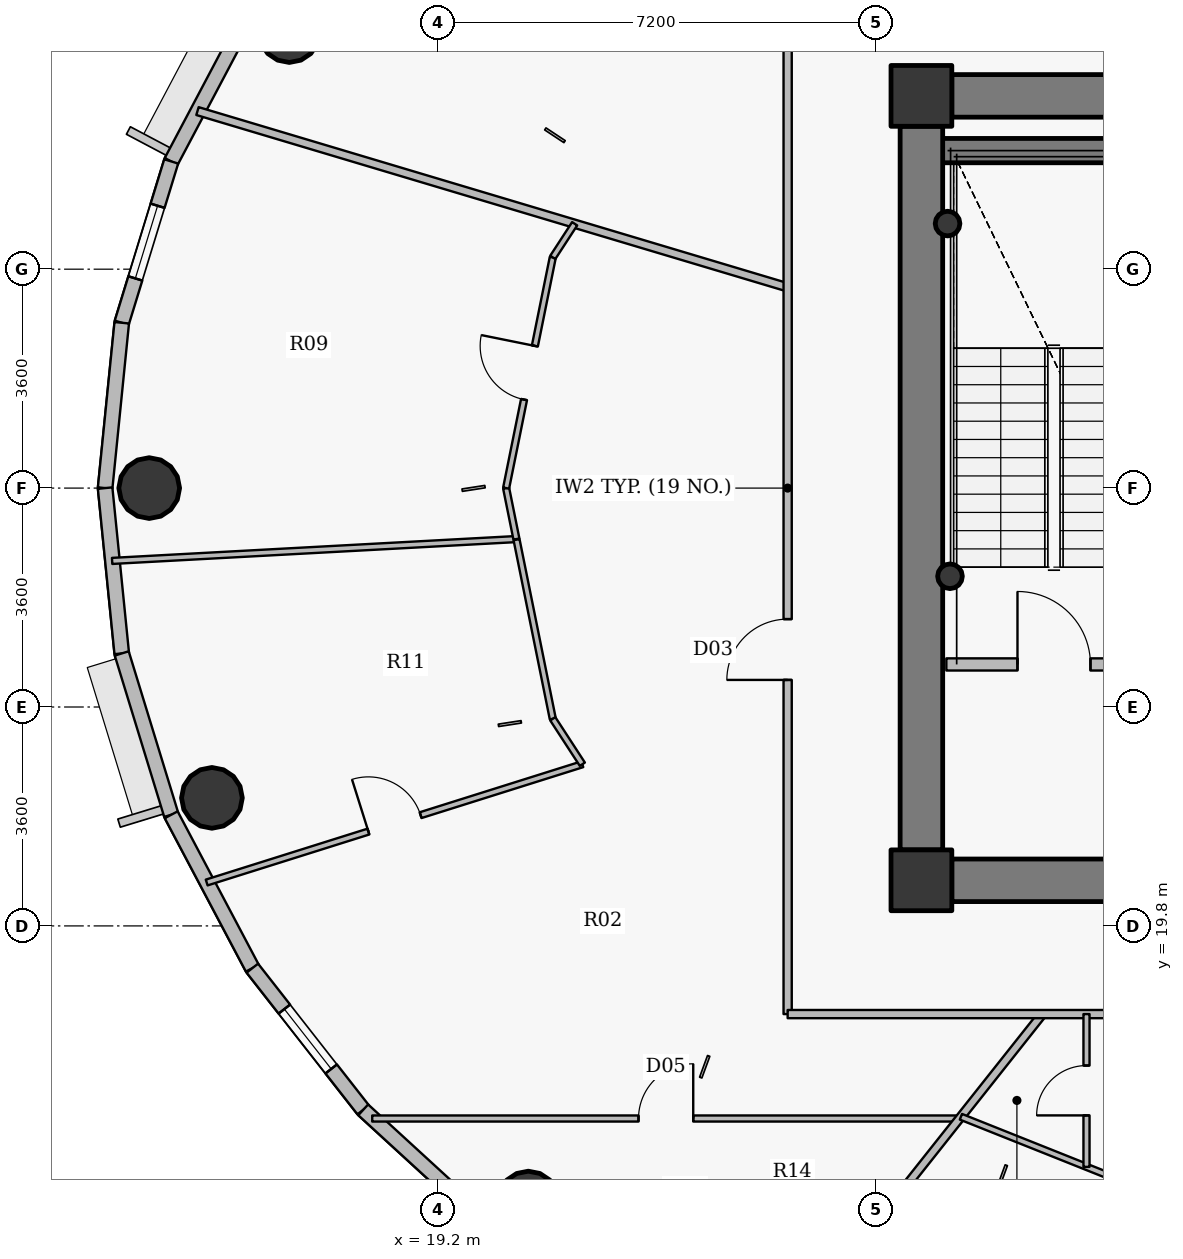
"""IFC4 building model, lengths in metres.
Left out: names, types, materials, properties, quantities, classifications, styles, units other than length and angle.
Written with IfcOpenShell. Run it as: python <this file> out.ifc"""

import sys

from ifc_helpers import new_model, si_unit, direction, frame, frame_2d, origin, origin_2d, place, context, subcontext, project, spatial, rectangle, hollow_circle, extrude, source, transform, mapped, element, fill, save


model = new_model("IFC4")
c1 = context("Model", 3, precision=1e-05, world=origin(), true_north=direction((0.0, 1.0)))
c2 = subcontext(c1, "Body", "Model", "MODEL_VIEW")
j1 = project(units=[si_unit("LENGTHUNIT", "METRE"), si_unit("PLANEANGLEUNIT", "RADIAN")], contexts=[c1])
p1 = place(None, origin())
s1 = spatial("IfcSite", under=j1, at=p1, CompositionType="ELEMENT")
p2 = place(p1, origin())
s2 = spatial("IfcBuilding", under=s1, at=p2, CompositionType="ELEMENT")
p3 = place(p2, frame((0.0, 0.0, 273.0)))
s3 = spatial("IfcBuildingStorey", under=s2, at=p3, CompositionType="ELEMENT", Elevation=273.0)
for number, where, z_axis, x_axis in (
    (1, (27.15, 20.55, 0.0), (0.0, 0.0, 1.0), (1.0, 0.0, 0.0)),
    (2, (27.15, 33.45, 0.0), (0.0, 0.0, 1.0), (1.0, 0.0, 0.0)),
):
    element("IfcColumn", number, at=place(p3, frame(where, z_axis=z_axis, x_axis=x_axis)), inside=s3, PredefinedType="COLUMN", context=c2, shape_type="SweptSolid", body=[
        extrude(rectangle(XDim=1.0, YDim=1.0, at=origin_2d()), origin(), (0.0, 0.0, 1.0), 3.75),
    ])
p4 = place(p3, frame((27.25, 32.55, 0.0), z_axis=(0.0, 0.0, 1.0), x_axis=(1.0, 0.0, 0.0)))
e3 = element("IfcWall", 3, at=p4, inside=s3, PredefinedType="SHEAR", context=c2, shape_type="SweptSolid", body=[
    extrude(rectangle(XDim=4.13, YDim=0.4, at=frame_2d((2.065, 0.0))), origin(), (0.0, 0.0, 1.0), 3.75),
])
for number, where, z_axis, x_axis in (
    (4, (27.58, 31.35, 0.0), (0.0, 0.0, 1.0), (1.0, 0.0, 0.0)),
    (5, (27.62, 25.55, 0.0), (0.0, 0.0, 1.0), (1.0, 0.0, 0.0)),
):
    element("IfcColumn", number, at=place(p3, frame(where, z_axis=z_axis, x_axis=x_axis)), inside=s3, PredefinedType="COLUMN", context=c2, shape_type="SweptSolid", body=[
        extrude(hollow_circle(Radius=0.203, WallThickness=0.016, at=origin_2d()), origin(), (0.0, 0.0, 1.0), 3.75),
    ])
p5 = place(p3, frame((27.65, 33.45, 0.0), z_axis=(0.0, 0.0, 1.0), x_axis=(1.0, 0.0, 0.0)))
e6 = element("IfcWall", 6, at=p5, inside=s3, PredefinedType="SHEAR", context=c2, shape_type="SweptSolid", body=[
    extrude(rectangle(XDim=16.7, YDim=0.7, at=frame_2d((8.35, 0.0))), origin(), (0.0, 0.0, 1.0), 3.05),
])
p6 = place(p5, frame((12.775, 0.0, 0.0)))
e7 = element("IfcOpeningElement", 7, at=p6, cuts=e6, PredefinedType="OPENING", context=c2, shape_type="SweptSolid", body=[
    extrude(rectangle(XDim=1.15, YDim=2.15, at=origin_2d()), frame((0.575, 0.36, 1.075), z_axis=(0.0, -1.0, 0.0), x_axis=(1.0, 0.0, 0.0)), (0.0, 0.0, 1.0), 0.72),
])
p7 = place(p3, frame((44.35, 20.55, 0.0), z_axis=(0.0, 0.0, 1.0), x_axis=(-1.0, 0.0, 0.0)))
e8 = element("IfcWall", 8, at=p7, inside=s3, PredefinedType="SHEAR", context=c2, shape_type="SweptSolid", body=[
    extrude(rectangle(XDim=16.7, YDim=0.7, at=frame_2d((8.35, 0.0))), origin(), (0.0, 0.0, 1.0), 3.05),
])
p8 = place(p7, frame((12.925, 0.0, 0.0)))
e9 = element("IfcOpeningElement", 9, at=p8, cuts=e8, PredefinedType="OPENING", context=c2, shape_type="SweptSolid", body=[
    extrude(rectangle(XDim=1.15, YDim=2.15, at=origin_2d()), frame((0.575, 0.36, 1.075), z_axis=(0.0, -1.0, 0.0), x_axis=(1.0, 0.0, 0.0)), (0.0, 0.0, 1.0), 0.72),
])
p9 = place(p7, frame((9.1, 0.0, 0.0)))
e10 = element("IfcOpeningElement", 10, at=p9, cuts=e8, PredefinedType="OPENING", context=c2, shape_type="SweptSolid", body=[
    extrude(rectangle(XDim=1.15, YDim=2.15, at=origin_2d()), frame((0.575, 0.36, 1.075), z_axis=(0.0, -1.0, 0.0), x_axis=(1.0, 0.0, 0.0)), (0.0, 0.0, 1.0), 0.72),
])
p10 = place(p3, frame((27.15, 21.05, 0.0), z_axis=(0.0, 0.0, 1.0), x_axis=(0.0, 1.0, 0.0)))
e11 = element("IfcWall", 11, at=p10, inside=s3, PredefinedType="SHEAR", context=c2, shape_type="SweptSolid", body=[
    extrude(rectangle(XDim=11.9, YDim=0.7, at=frame_2d((5.95, 0.0))), origin(), (0.0, 0.0, 1.0), 3.05),
])
for number, where, z_axis, x_axis in (
    (12, (16.754, 34.5, 0.0), (0.0, 0.0, 1.0), (1.0, 0.0, 0.0)),
    (13, (14.45, 27.0, 0.0), (0.0, 0.0, 1.0), (1.0, 0.0, 0.0)),
    (14, (15.481, 21.906, 0.0), (0.0, 0.0, 1.0), (1.0, 0.0, 0.0)),
    (15, (20.685, 15.267, 0.0), (0.0, 0.0, 1.0), (1.0, 0.0, 0.0)),
):
    element("IfcColumn", number, at=place(p3, frame(where, z_axis=z_axis, x_axis=x_axis)), inside=s3, PredefinedType="COLUMN", context=c2, shape_type="SweptSolid", body=[
        extrude(hollow_circle(Radius=0.5, WallThickness=0.032, at=origin_2d()), origin(), (0.0, 0.0, 1.0), 3.75),
    ])
p11 = place(p3, frame((14.812, 32.372, 0.0), z_axis=(0.0, 0.0, 1.0), x_axis=(0.467628269026, 0.883925224218, 0.0)))
e16 = element("IfcWall", 16, at=p11, inside=s3, PredefinedType="SOLIDWALL", context=c2, shape_type="SweptSolid", body=[
    extrude(rectangle(XDim=2.854, YDim=0.24, at=frame_2d((1.427, 0.0))), origin(), (0.0, 0.0, 1.0), 3.5),
])
p12 = place(p3, frame((13.998, 29.719, 0.0), z_axis=(0.0, 0.0, 1.0), x_axis=(0.2931213403, 0.956075248012, 0.0)))
e17 = element("IfcWall", 17, at=p12, inside=s3, PredefinedType="SOLIDWALL", context=c2, shape_type="SweptSolid", body=[
    extrude(rectangle(XDim=2.775, YDim=0.24, at=frame_2d((1.388, 0.0))), origin(), (0.0, 0.0, 1.0), 3.5),
])
p13 = place(p12, frame((0.763, 0.0, 0.9)))
e18 = element("IfcOpeningElement", 18, at=p13, cuts=e17, PredefinedType="OPENING", context=c2, shape_type="SweptSolid", body=[
    extrude(rectangle(XDim=1.25, YDim=1.65, at=origin_2d()), frame((0.625, 0.13, 0.825), z_axis=(0.0, -1.0, 0.0), x_axis=(1.0, 0.0, 0.0)), (0.0, 0.0, 1.0), 0.26),
])
for number, where, z_axis, x_axis in (
    (19, (13.725, 27.0, 0.0), (0.0, 0.0, 1.0), (0.1, 0.995, 0.0)),
    (20, (13.998, 24.281, 0.0), (0.0, 0.0, 1.0), (-0.1, 0.995, 0.0)),
):
    element("IfcWall", number, at=place(p3, frame(where, z_axis=z_axis, x_axis=x_axis)), inside=s3, PredefinedType="SOLIDWALL", context=c2, shape_type="SweptSolid", body=[
        extrude(rectangle(XDim=2.733, YDim=0.24, at=frame_2d((1.366, 0.0))), origin(), (0.0, 0.0, 1.0), 3.5),
    ])
p14 = place(p3, frame((14.812, 21.628, 0.0), z_axis=(0.0, 0.0, 1.0), x_axis=(-0.2931213403, 0.956075248012, 0.0)))
e21 = element("IfcWall", 21, at=p14, inside=s3, PredefinedType="SOLIDWALL", context=c2, shape_type="SweptSolid", body=[
    extrude(rectangle(XDim=2.775, YDim=0.24, at=frame_2d((1.388, 0.0))), origin(), (0.0, 0.0, 1.0), 3.5),
])
p15 = place(p3, frame((16.146, 19.105, 0.0), z_axis=(0.0, 0.0, 1.0), x_axis=(-0.467628269026, 0.883925224218, 0.0)))
e22 = element("IfcWall", 22, at=p15, inside=s3, PredefinedType="SOLIDWALL", context=c2, shape_type="SweptSolid", body=[
    extrude(rectangle(XDim=2.854, YDim=0.24, at=frame_2d((1.427, 0.0))), origin(), (0.0, 0.0, 1.0), 3.5),
])
p16 = place(p3, frame((17.97, 16.775, 0.0), z_axis=(0.0, 0.0, 1.0), x_axis=(-0.616337186556, 0.787482363275, 0.0)))
e23 = element("IfcWall", 23, at=p16, inside=s3, PredefinedType="SOLIDWALL", context=c2, shape_type="SweptSolid", body=[
    extrude(rectangle(XDim=2.958, YDim=0.24, at=frame_2d((1.479, 0.0))), origin(), (0.0, 0.0, 1.0), 3.5),
])
p17 = place(p16, frame((0.854, 0.0, 0.9)))
e24 = element("IfcOpeningElement", 24, at=p17, cuts=e23, PredefinedType="OPENING", context=c2, shape_type="SweptSolid", body=[
    extrude(rectangle(XDim=1.25, YDim=1.65, at=origin_2d()), frame((0.625, 0.13, 0.825), z_axis=(0.0, -1.0, 0.0), x_axis=(1.0, 0.0, 0.0)), (0.0, 0.0, 1.0), 0.26),
])
p18 = place(p3, frame((20.238, 14.696, 0.0), z_axis=(0.0, 0.0, 1.0), x_axis=(-0.737068506972, 0.675818034703, 0.0)))
e25 = element("IfcWall", 25, at=p18, inside=s3, PredefinedType="SOLIDWALL", context=c2, shape_type="SweptSolid", body=[
    extrude(rectangle(XDim=3.077, YDim=0.24, at=frame_2d((1.539, 0.0))), origin(), (0.0, 0.0, 1.0), 3.5),
])
p19 = place(p3, frame((13.84, 25.802, 0.0), z_axis=(0.0, 0.0, 1.0), x_axis=(0.998542593702, 0.05396932983, 0.0)))
e26 = element("IfcWall", 26, at=p19, inside=s3, PredefinedType="PARTITIONING", context=c2, shape_type="SweptSolid", body=[
    extrude(rectangle(XDim=6.659, YDim=0.1, at=frame_2d((3.33, 0.0))), origin(), (0.0, 0.0, 1.0), 2.985),
])
p20 = place(p3, frame((15.244, 33.2, 0.0), z_axis=(0.0, 0.0, 1.0), x_axis=(0.958167234785, -0.286208927508, 0.0)))
e27 = element("IfcWall", 27, at=p20, inside=s3, PredefinedType="PARTITIONING", context=c2, shape_type="SweptSolid", body=[
    extrude(rectangle(XDim=10.13, YDim=0.135, at=frame_2d((5.065, 0.0))), origin(), (0.0, 0.0, 1.0), 2.985),
])
p21 = place(p3, frame((15.396, 20.514, 0.0), z_axis=(0.0, 0.0, 1.0), x_axis=(0.95385684782, 0.300261742264, 0.0)))
e28 = element("IfcWall", 28, at=p21, inside=s3, PredefinedType="PARTITIONING", context=c2, shape_type="SweptSolid", body=[
    extrude(rectangle(XDim=6.477, YDim=0.1, at=frame_2d((3.239, 0.0))), origin(), (0.0, 0.0, 1.0), 2.985),
])
p22 = place(p21, frame((2.789, 0.0, 0.0)))
e29 = element("IfcOpeningElement", 29, at=p22, cuts=e28, PredefinedType="OPENING", context=c2, shape_type="SweptSolid", body=[
    extrude(rectangle(XDim=0.9, YDim=2.1, at=origin_2d()), frame((0.45, 0.06, 1.05), z_axis=(0.0, -1.0, 0.0), x_axis=(1.0, 0.0, 0.0)), (0.0, 0.0, 1.0), 0.12),
])
p23 = place(p3, frame((18.118, 16.633, 0.0), z_axis=(0.0, 0.0, 1.0), x_axis=(1.0, 0.0, 0.0)))
e30 = element("IfcWall", 30, at=p23, inside=s3, PredefinedType="PARTITIONING", context=c2, shape_type="SweptSolid", body=[
    extrude(rectangle(XDim=9.659, YDim=0.1, at=frame_2d((4.83, 0.0))), origin(), (0.0, 0.0, 1.0), 2.985),
])
p24 = place(p23, frame((4.379, 0.0, 0.0)))
e31 = element("IfcOpeningElement", 31, at=p24, cuts=e30, PredefinedType="OPENING", context=c2, shape_type="SweptSolid", body=[
    extrude(rectangle(XDim=0.9, YDim=2.1, at=origin_2d()), frame((0.45, 0.06, 1.05), z_axis=(0.0, -1.0, 0.0), x_axis=(1.0, 0.0, 0.0)), (0.0, 0.0, 1.0), 0.12),
])
p25 = place(p3, frame((20.32, 27.0, 0.0), z_axis=(0.0, 0.0, 1.0), x_axis=(0.198147261764, -0.980172261725, 0.0)))
e32 = element("IfcWall", 32, at=p25, inside=s3, PredefinedType="PARTITIONING", context=c2, shape_type="SweptSolid", body=[
    extrude(rectangle(XDim=0.855, YDim=0.1, at=frame_2d((0.427, 0.0))), origin(), (0.0, 0.0, 1.0), 3.035),
])
p26 = place(p3, frame((20.32, 27.0, 0.0), z_axis=(0.0, 0.0, 1.0), x_axis=(0.198226068862, 0.980156327135, 0.0)))
e33 = element("IfcWall", 33, at=p26, inside=s3, PredefinedType="PARTITIONING", context=c2, shape_type="SweptSolid", body=[
    extrude(rectangle(XDim=3.871, YDim=0.1, at=frame_2d((1.936, 0.0))), origin(), (0.0, 0.0, 1.0), 3.035),
])
p27 = place(p26, frame((1.486, 0.0, 0.0)))
e34 = element("IfcOpeningElement", 34, at=p27, cuts=e33, PredefinedType="OPENING", context=c2, shape_type="SweptSolid", body=[
    extrude(rectangle(XDim=0.9, YDim=2.1, at=origin_2d()), frame((0.45, 0.06, 1.05), z_axis=(0.0, -1.0, 0.0), x_axis=(1.0, 0.0, 0.0)), (0.0, 0.0, 1.0), 0.12),
])
p28 = place(p3, frame((20.491, 26.152, 0.0), z_axis=(0.0, 0.0, 1.0), x_axis=(0.198255475343, -0.980150379532, 0.0)))
e35 = element("IfcWall", 35, at=p28, inside=s3, PredefinedType="PARTITIONING", context=c2, shape_type="SweptSolid", body=[
    extrude(rectangle(XDim=3.006, YDim=0.1, at=frame_2d((1.503, 0.0))), origin(), (0.0, 0.0, 1.0), 3.035),
])
p29 = place(p3, frame((21.087, 23.206, 0.0), z_axis=(0.0, 0.0, 1.0), x_axis=(0.545565820765, -0.838067977681, 0.0)))
e36 = element("IfcWall", 36, at=p29, inside=s3, PredefinedType="PARTITIONING", context=c2, shape_type="SweptSolid", body=[
    extrude(rectangle(XDim=0.891, YDim=0.1, at=frame_2d((0.446, 0.0))), origin(), (0.0, 0.0, 1.0), 3.035),
])
p30 = place(p3, frame((21.087, 30.794, 0.0), z_axis=(0.0, 0.0, 1.0), x_axis=(0.545443507803, 0.838147588313, 0.0)))
e37 = element("IfcWall", 37, at=p30, inside=s3, PredefinedType="PARTITIONING", context=c2, shape_type="SweptSolid", body=[
    extrude(rectangle(XDim=0.66, YDim=0.1, at=frame_2d((0.33, 0.0))), origin(), (0.0, 0.0, 1.0), 3.5),
])
p31 = place(p3, frame((24.294, 12.242, 0.0), z_axis=(0.0, 0.0, 1.0), x_axis=(0.621439784824, 0.783461928774, 0.0)))
e38 = element("IfcWall", 38, at=p31, inside=s3, PredefinedType="PARTITIONING", context=c2, shape_type="SweptSolid", body=[
    extrude(rectangle(XDim=7.796, YDim=0.135, at=frame_2d((3.898, 0.0))), origin(), (0.0, 0.0, 1.0), 2.985),
])
p32 = place(p3, frame((24.95, 18.35, 0.0), z_axis=(0.0, 0.0, 1.0), x_axis=(0.0, 1.0, 0.0)))
e39 = element("IfcWall", 39, at=p32, inside=s3, PredefinedType="PARTITIONING", context=c2, shape_type="SweptSolid", body=[
    extrude(rectangle(XDim=17.3, YDim=0.135, at=frame_2d((8.65, 0.0))), origin(), (0.0, 0.0, 1.0), 3.035),
])
p33 = place(p32, frame((5.495, 0.0, 0.0)))
e40 = element("IfcOpeningElement", 40, at=p33, cuts=e39, PredefinedType="OPENING", context=c2, shape_type="SweptSolid", body=[
    extrude(rectangle(XDim=1.0, YDim=2.15, at=origin_2d()), frame((0.5, 0.078, 1.075), z_axis=(0.0, -1.0, 0.0), x_axis=(1.0, 0.0, 0.0)), (0.0, 0.0, 1.0), 0.155),
])
p34 = place(p3, frame((24.95, 18.35, 0.0), z_axis=(0.0, 0.0, 1.0), x_axis=(1.0, 0.0, 0.0)))
e41 = element("IfcWall", 41, at=p34, inside=s3, PredefinedType="PARTITIONING", context=c2, shape_type="SweptSolid", body=[
    extrude(rectangle(XDim=10.1, YDim=0.135, at=frame_2d((5.05, 0.0))), origin(), (0.0, 0.0, 1.0), 3.035),
])
p35 = place(p3, frame((27.56, 24.1, 0.0), z_axis=(0.0, 0.0, 1.0), x_axis=(1.0, 0.0, 0.0)))
e42 = element("IfcWall", 42, at=p35, inside=s3, PredefinedType="PARTITIONING", context=c2, shape_type="SweptSolid", body=[
    extrude(rectangle(XDim=3.54, YDim=0.2, at=frame_2d((1.77, 0.0))), origin(), (0.0, 0.0, 1.0), 3.5),
])
p36 = place(p35, frame((1.17, 0.0, 0.0)))
e43 = element("IfcOpeningElement", 43, at=p36, cuts=e42, PredefinedType="OPENING", context=c2, shape_type="SweptSolid", body=[
    extrude(rectangle(XDim=1.2, YDim=2.15, at=origin_2d()), frame((0.6, 0.11, 1.075), z_axis=(0.0, -1.0, 0.0), x_axis=(1.0, 0.0, 0.0)), (0.0, 0.0, 1.0), 0.22),
])
p37 = place(p3, frame((27.8, 16.662, 0.0), z_axis=(0.0, 0.0, 1.0), x_axis=(0.928783988526, -0.370621508628, 0.0)))
e44 = element("IfcWall", 44, at=p37, inside=s3, PredefinedType="PARTITIONING", context=c2, shape_type="SweptSolid", body=[
    extrude(rectangle(XDim=3.613, YDim=0.1, at=frame_2d((1.806, 0.0))), origin(), (0.0, 0.0, 1.0), 3.035),
])
p38 = place(p3, frame((29.865, 15.837, 0.0), z_axis=(0.0, 0.0, 1.0), x_axis=(0.0, 1.0, 0.0)))
e45 = element("IfcWall", 45, at=p38, inside=s3, PredefinedType="PARTITIONING", context=c2, shape_type="SweptSolid", body=[
    extrude(rectangle(XDim=2.513, YDim=0.1, at=frame_2d((1.256, 0.0))), origin(), (0.0, 0.0, 1.0), 3.035),
])
p39 = place(p38, frame((0.846, 0.0, 0.0)))
e46 = element("IfcOpeningElement", 46, at=p39, cuts=e45, PredefinedType="OPENING", context=c2, shape_type="SweptSolid", body=[
    extrude(rectangle(XDim=0.82, YDim=2.1, at=origin_2d()), frame((0.41, 0.06, 1.05), z_axis=(0.0, -1.0, 0.0), x_axis=(1.0, 0.0, 0.0)), (0.0, 0.0, 1.0), 0.12),
])
p40 = place(p3, frame((27.64, 33.8, 0.0), z_axis=(0.0, 0.0, 1.0), x_axis=(-1.0, 0.0, 0.0)))
e47 = element("IfcWall", 47, at=p40, inside=s3, PredefinedType="PARTITIONING", context=c2, shape_type="SweptSolid", body=[
    extrude(rectangle(XDim=0.84, YDim=0.135, at=frame_2d((0.42, 0.0))), origin(), (0.0, 0.0, 1.0), 3.035),
])
p41 = place(p3, frame((26.8, 33.492, 0.0), z_axis=(0.0, 0.0, 1.0), x_axis=(0.0, -1.0, 0.0)))
e48 = element("IfcWall", 48, at=p41, inside=s3, PredefinedType="PARTITIONING", context=c2, shape_type="SweptSolid", body=[
    extrude(rectangle(XDim=0.532, YDim=0.135, at=frame_2d((0.266, 0.0))), origin(), (0.0, 0.0, 1.0), 3.5),
])
p42 = place(p3, frame((26.8, 21.04, 0.0), z_axis=(0.0, 0.0, 1.0), x_axis=(0.0, -1.0, 0.0)))
e49 = element("IfcWall", 49, at=p42, inside=s3, PredefinedType="PARTITIONING", context=c2, shape_type="SweptSolid", body=[
    extrude(rectangle(XDim=0.84, YDim=0.135, at=frame_2d((0.42, 0.0))), origin(), (0.0, 0.0, 1.0), 3.035),
])
p43 = place(p3, frame((27.107, 20.2, 0.0), z_axis=(0.0, 0.0, 1.0), x_axis=(1.0, 0.0, 0.0)))
e50 = element("IfcWall", 50, at=p43, inside=s3, PredefinedType="PARTITIONING", context=c2, shape_type="SweptSolid", body=[
    extrude(rectangle(XDim=0.532, YDim=0.135, at=frame_2d((0.266, 0.0))), origin(), (0.0, 0.0, 1.0), 3.035),
])
m1 = source(origin(), c2, "Body", "SweptSolid", [
    extrude(rectangle(XDim=1.25, YDim=1.65, at=origin_2d()), frame((0.625, 0.03, 0.825), z_axis=(0.0, -1.0, 0.0), x_axis=(1.0, 0.0, 0.0)), (0.0, 0.0, 1.0), 0.06),
])
p44 = place(p13, origin())
e51 = element("IfcWindow", 51, at=p44, inside=s3, PartitioningType="SINGLE_PANEL", PredefinedType="WINDOW", context=c2, shape_type="MappedRepresentation", body=[
    mapped(m1, transform((0.0, 0.0, 0.0), x_axis=(1.0, 0.0, 0.0), y_axis=(0.0, 1.0, 0.0), z_axis=(0.0, 0.0, 1.0), scale=1.0)),
])
fill(e18, e51)
p45 = place(p17, origin())
e52 = element("IfcWindow", 52, at=p45, inside=s3, PartitioningType="SINGLE_PANEL", PredefinedType="WINDOW", context=c2, shape_type="MappedRepresentation", body=[
    mapped(m1, transform((0.0, 0.0, 0.0), x_axis=(1.0, 0.0, 0.0), y_axis=(0.0, 1.0, 0.0), z_axis=(0.0, 0.0, 1.0), scale=1.0)),
])
fill(e24, e52)
m2 = source(origin(), c2, "Body", "SweptSolid", [
    extrude(rectangle(XDim=1.2, YDim=2.15, at=origin_2d()), frame((0.6, 0.025, 1.075), z_axis=(0.0, -1.0, 0.0), x_axis=(1.0, 0.0, 0.0)), (0.0, 0.0, 1.0), 0.05),
])
p46 = place(p36, origin())
e53 = element("IfcDoor", 53, at=p46, inside=s3, OperationType="SINGLE_SWING_LEFT", PredefinedType="DOOR", context=c2, shape_type="MappedRepresentation", body=[
    mapped(m2, transform((0.0, 0.0, 0.0), x_axis=(1.0, 0.0, 0.0), y_axis=(0.0, 1.0, 0.0), z_axis=(0.0, 0.0, 1.0), scale=1.0)),
])
fill(e43, e53)
m3 = source(origin(), c2, "Body", "SweptSolid", [
    extrude(rectangle(XDim=1.0, YDim=2.15, at=origin_2d()), frame((0.5, 0.025, 1.075), z_axis=(0.0, -1.0, 0.0), x_axis=(1.0, 0.0, 0.0)), (0.0, 0.0, 1.0), 0.05),
])
p47 = place(p33, origin())
e54 = element("IfcDoor", 54, at=p47, inside=s3, OperationType="SINGLE_SWING_LEFT", PredefinedType="DOOR", context=c2, shape_type="MappedRepresentation", body=[
    mapped(m3, transform((0.0, 0.0, 0.0), x_axis=(1.0, 0.0, 0.0), y_axis=(0.0, 1.0, 0.0), z_axis=(0.0, 0.0, 1.0), scale=1.0)),
])
fill(e40, e54)
m4 = source(origin(), c2, "Body", "SweptSolid", [
    extrude(rectangle(XDim=0.9, YDim=2.1, at=origin_2d()), frame((0.45, 0.025, 1.05), z_axis=(0.0, -1.0, 0.0), x_axis=(1.0, 0.0, 0.0)), (0.0, 0.0, 1.0), 0.05),
])
p48 = place(p27, origin())
e55 = element("IfcDoor", 55, at=p48, inside=s3, OperationType="SINGLE_SWING_RIGHT", PredefinedType="DOOR", context=c2, shape_type="MappedRepresentation", body=[
    mapped(m4, transform((0.0, 0.0, 0.0), x_axis=(1.0, 0.0, 0.0), y_axis=(0.0, 1.0, 0.0), z_axis=(0.0, 0.0, 1.0), scale=1.0)),
])
fill(e34, e55)
p49 = place(p22, origin())
e56 = element("IfcDoor", 56, at=p49, inside=s3, OperationType="SINGLE_SWING_LEFT", PredefinedType="DOOR", context=c2, shape_type="MappedRepresentation", body=[
    mapped(m4, transform((0.0, 0.0, 0.0), x_axis=(1.0, 0.0, 0.0), y_axis=(0.0, 1.0, 0.0), z_axis=(0.0, 0.0, 1.0), scale=1.0)),
])
fill(e29, e56)
p50 = place(p24, origin())
e57 = element("IfcDoor", 57, at=p50, inside=s3, OperationType="SINGLE_SWING_RIGHT", PredefinedType="DOOR", context=c2, shape_type="MappedRepresentation", body=[
    mapped(m4, transform((0.0, 0.0, 0.0), x_axis=(1.0, 0.0, 0.0), y_axis=(0.0, 1.0, 0.0), z_axis=(0.0, 0.0, 1.0), scale=1.0)),
])
fill(e31, e57)
m5 = source(origin(), c2, "Body", "SweptSolid", [
    extrude(rectangle(XDim=0.82, YDim=2.1, at=origin_2d()), frame((0.41, 0.025, 1.05), z_axis=(0.0, -1.0, 0.0), x_axis=(1.0, 0.0, 0.0)), (0.0, 0.0, 1.0), 0.05),
])
p51 = place(p39, origin())
e58 = element("IfcDoor", 58, at=p51, inside=s3, OperationType="SINGLE_SWING_LEFT", PredefinedType="DOOR", context=c2, shape_type="MappedRepresentation", body=[
    mapped(m5, transform((0.0, 0.0, 0.0), x_axis=(1.0, 0.0, 0.0), y_axis=(0.0, 1.0, 0.0), z_axis=(0.0, 0.0, 1.0), scale=1.0)),
])
fill(e46, e58)
save(model, sys.argv[1])
